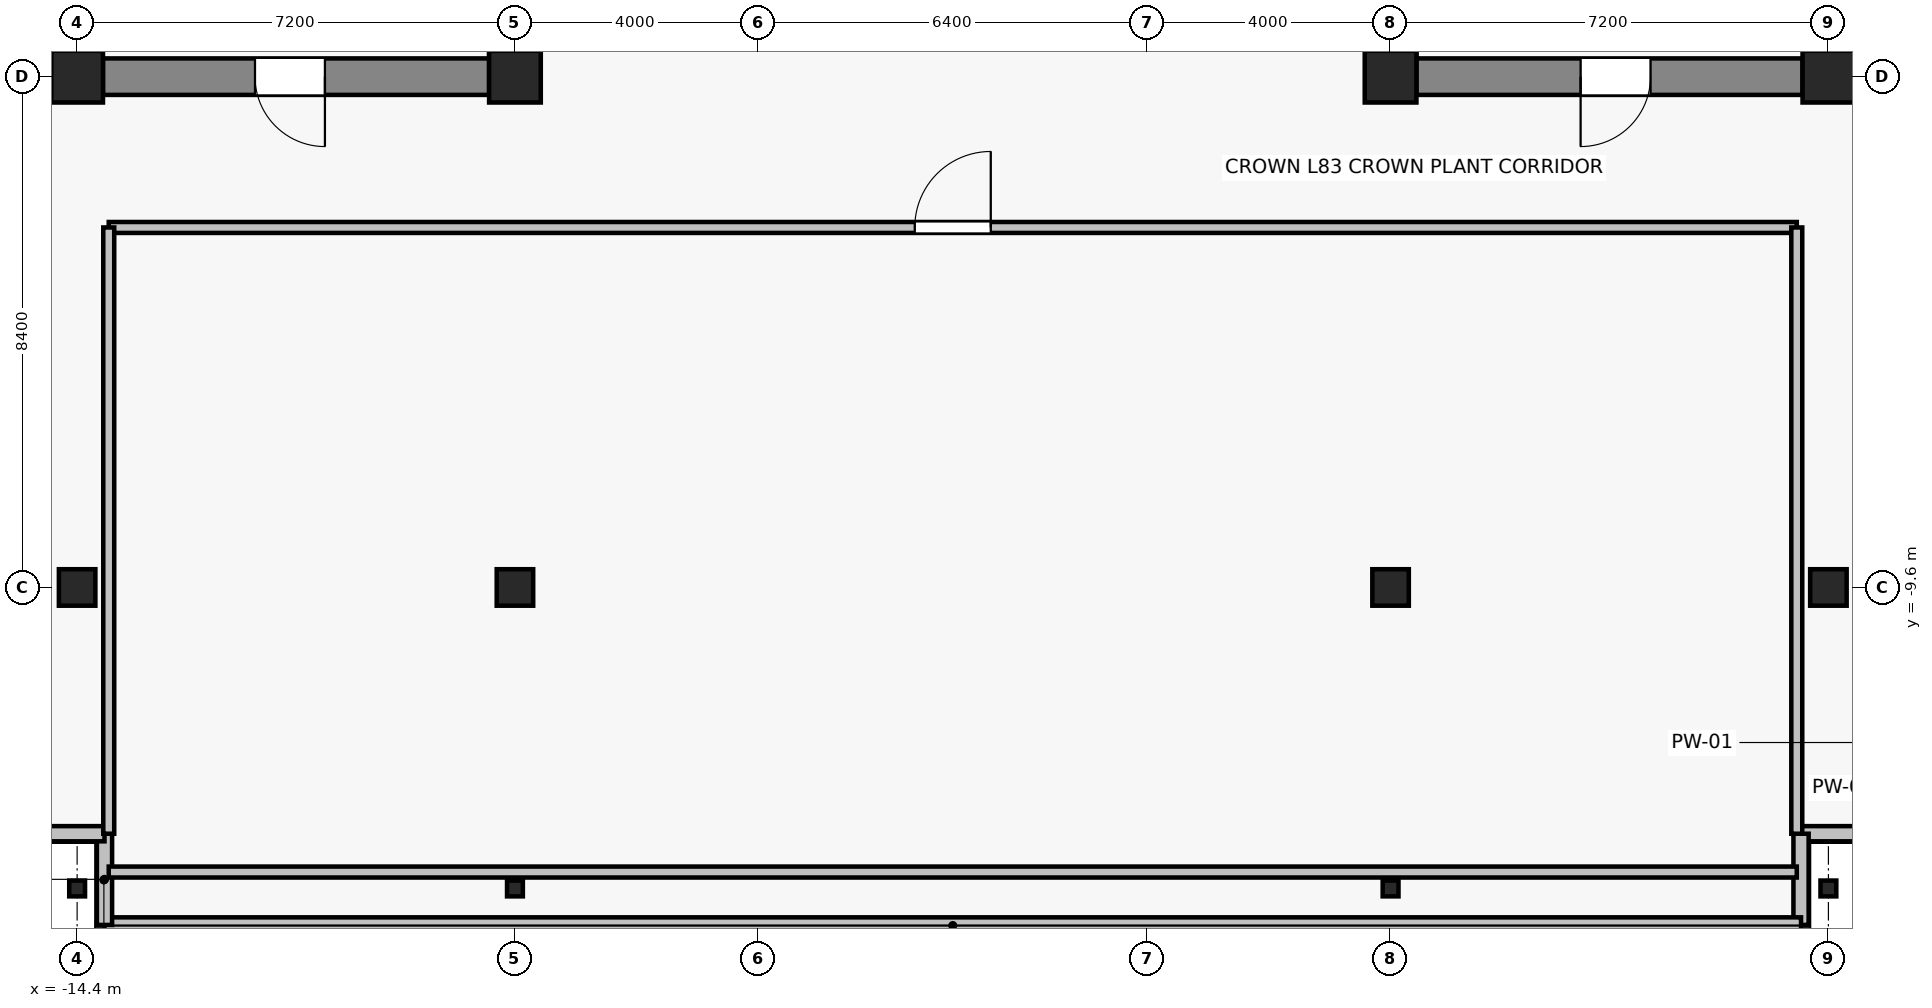
"""IFC4 building model, lengths in metres.
Left out: names, types, materials, properties, quantities, classifications, styles, units other than length and angle.
Written with IfcOpenShell. Run it as: python <this file> out.ifc"""

import sys

from ifc_helpers import new_model, si_unit, direction, frame, frame_2d, origin, origin_2d, place, context, subcontext, project, spatial, rectangle, i_section, extrude, source, transform, mapped, element, fill, save


model = new_model("IFC4")
c1 = context("Model", 3, precision=1e-05, world=origin(), true_north=direction((0.0, 1.0)))
c2 = subcontext(c1, "Body", "Model", "MODEL_VIEW")
j1 = project(units=[si_unit("LENGTHUNIT", "METRE"), si_unit("PLANEANGLEUNIT", "RADIAN")], contexts=[c1])
p1 = place(None, origin())
s1 = spatial("IfcSite", under=j1, at=p1, CompositionType="ELEMENT")
p2 = place(p1, origin())
s2 = spatial("IfcBuilding", under=s1, at=p2, CompositionType="ELEMENT")
p3 = place(p2, frame((0.0, 0.0, 294.6)))
s3 = spatial("IfcBuildingStorey", under=s2, at=p3, CompositionType="ELEMENT", Elevation=294.6)
for number, where, z_axis, x_axis in (
    (1, (-14.4, -1.2, 0.0), (0.0, 0.0, 1.0), (1.0, 0.0, 0.0)),
    (2, (-7.2, -1.2, 0.0), (0.0, 0.0, 1.0), (1.0, 0.0, 0.0)),
    (3, (7.2, -1.2, 0.0), (0.0, 0.0, 1.0), (1.0, 0.0, 0.0)),
    (4, (14.4, -1.2, 0.0), (0.0, 0.0, 1.0), (1.0, 0.0, 0.0)),
):
    element("IfcColumn", number, at=place(p3, frame(where, z_axis=z_axis, x_axis=x_axis)), inside=s3, PredefinedType="COLUMN", context=c2, shape_type="SweptSolid", body=[
        extrude(rectangle(XDim=0.85, YDim=0.85, at=origin_2d()), origin(), (0.0, 0.0, 1.0), 4.6),
    ])
p4 = place(p3, frame((-14.4, -9.6, 0.0), z_axis=(0.0, 0.0, 1.0), x_axis=(1.0, 0.0, 0.0)))
e5 = element("IfcColumn", 5, at=p4, inside=s3, PredefinedType="COLUMN", context=c2, shape_type="SweptSolid", body=[
    extrude(rectangle(XDim=0.6, YDim=0.6, at=origin_2d()), origin(), (0.0, 0.0, 1.0), 4.6),
])
p5 = place(p3, frame((-14.4, -14.55, 0.0), z_axis=(0.0, 0.0, 1.0), x_axis=(1.0, 0.0, 0.0)))
e6 = element("IfcColumn", 6, at=p5, inside=s3, PredefinedType="COLUMN", context=c2, shape_type="SweptSolid", body=[
    extrude(i_section(OverallWidth=0.26, OverallDepth=0.26, WebThickness=0.01, FlangeThickness=0.018, FilletRadius=0.024, at=origin_2d()), origin(), (0.0, 0.0, 1.0), 4.6),
])
p6 = place(p3, frame((-7.2, -9.6, 0.0), z_axis=(0.0, 0.0, 1.0), x_axis=(1.0, 0.0, 0.0)))
e7 = element("IfcColumn", 7, at=p6, inside=s3, PredefinedType="COLUMN", context=c2, shape_type="SweptSolid", body=[
    extrude(rectangle(XDim=0.6, YDim=0.6, at=origin_2d()), origin(), (0.0, 0.0, 1.0), 4.6),
])
p7 = place(p3, frame((-7.2, -14.55, 0.0), z_axis=(0.0, 0.0, 1.0), x_axis=(1.0, 0.0, 0.0)))
e8 = element("IfcColumn", 8, at=p7, inside=s3, PredefinedType="COLUMN", context=c2, shape_type="SweptSolid", body=[
    extrude(i_section(OverallWidth=0.26, OverallDepth=0.26, WebThickness=0.01, FlangeThickness=0.018, FilletRadius=0.024, at=origin_2d()), origin(), (0.0, 0.0, 1.0), 4.6),
])
p8 = place(p3, frame((7.2, -9.6, 0.0), z_axis=(0.0, 0.0, 1.0), x_axis=(1.0, 0.0, 0.0)))
e9 = element("IfcColumn", 9, at=p8, inside=s3, PredefinedType="COLUMN", context=c2, shape_type="SweptSolid", body=[
    extrude(rectangle(XDim=0.6, YDim=0.6, at=origin_2d()), origin(), (0.0, 0.0, 1.0), 4.6),
])
p9 = place(p3, frame((7.2, -14.55, 0.0), z_axis=(0.0, 0.0, 1.0), x_axis=(1.0, 0.0, 0.0)))
e10 = element("IfcColumn", 10, at=p9, inside=s3, PredefinedType="COLUMN", context=c2, shape_type="SweptSolid", body=[
    extrude(i_section(OverallWidth=0.26, OverallDepth=0.26, WebThickness=0.01, FlangeThickness=0.018, FilletRadius=0.024, at=origin_2d()), origin(), (0.0, 0.0, 1.0), 4.6),
])
p10 = place(p3, frame((14.4, -9.6, 0.0), z_axis=(0.0, 0.0, 1.0), x_axis=(1.0, 0.0, 0.0)))
e11 = element("IfcColumn", 11, at=p10, inside=s3, PredefinedType="COLUMN", context=c2, shape_type="SweptSolid", body=[
    extrude(rectangle(XDim=0.6, YDim=0.6, at=origin_2d()), origin(), (0.0, 0.0, 1.0), 4.6),
])
p11 = place(p3, frame((14.4, -14.55, 0.0), z_axis=(0.0, 0.0, 1.0), x_axis=(1.0, 0.0, 0.0)))
e12 = element("IfcColumn", 12, at=p11, inside=s3, PredefinedType="COLUMN", context=c2, shape_type="SweptSolid", body=[
    extrude(i_section(OverallWidth=0.26, OverallDepth=0.26, WebThickness=0.01, FlangeThickness=0.018, FilletRadius=0.024, at=origin_2d()), origin(), (0.0, 0.0, 1.0), 4.6),
])
p12 = place(p3, frame((-7.625, -1.2, 0.0), z_axis=(0.0, 0.0, 1.0), x_axis=(-1.0, 0.0, 0.0)))
e13 = element("IfcWall", 13, at=p12, inside=s3, PredefinedType="SHEAR", context=c2, shape_type="SweptSolid", body=[
    extrude(rectangle(XDim=6.35, YDim=0.6, at=frame_2d((3.175, 0.0))), origin(), (0.0, 0.0, 1.0), 4.38),
])
p13 = place(p12, frame((2.7, 0.0, 0.0)))
e14 = element("IfcOpeningElement", 14, at=p13, cuts=e13, PredefinedType="OPENING", context=c2, shape_type="SweptSolid", body=[
    extrude(rectangle(XDim=1.15, YDim=2.15, at=frame_2d((0.575, 1.075))), frame((0.0, 0.31, 0.0), z_axis=(0.0, -1.0, 0.0), x_axis=(1.0, 0.0, 0.0)), (0.0, 0.0, 1.0), 0.62),
])
p14 = place(p3, frame((13.975, -1.2, 0.0), z_axis=(0.0, 0.0, 1.0), x_axis=(-1.0, 0.0, 0.0)))
e15 = element("IfcWall", 15, at=p14, inside=s3, PredefinedType="SHEAR", context=c2, shape_type="SweptSolid", body=[
    extrude(rectangle(XDim=6.35, YDim=0.6, at=frame_2d((3.175, 0.0))), origin(), (0.0, 0.0, 1.0), 4.38),
])
p15 = place(p14, frame((2.5, 0.0, 0.0)))
e16 = element("IfcOpeningElement", 16, at=p15, cuts=e15, PredefinedType="OPENING", context=c2, shape_type="SweptSolid", body=[
    extrude(rectangle(XDim=1.15, YDim=2.15, at=frame_2d((0.575, 1.075))), frame((0.0, 0.31, 0.0), z_axis=(0.0, -1.0, 0.0), x_axis=(1.0, 0.0, 0.0)), (0.0, 0.0, 1.0), 0.62),
])
for number, where, z_axis, x_axis in (
    (17, (-7.4, -0.9, 0.0), (0.0, 0.0, 1.0), (0.0, 1.0, 0.0)),
    (18, (7.4, -0.9, 0.0), (0.0, 0.0, 1.0), (0.0, 1.0, 0.0)),
):
    element("IfcWall", number, at=place(p3, frame(where, z_axis=z_axis, x_axis=x_axis)), inside=s3, PredefinedType="SHEAR", context=c2, shape_type="SweptSolid", body=[
        extrude(rectangle(XDim=4.15, YDim=0.45, at=frame_2d((2.075, 0.0))), origin(), (0.0, 0.0, 1.0), 4.38),
    ])
for number, where, z_axis, x_axis in (
    (19, (14.56, -13.91, 0.0), (0.0, 0.0, 1.0), (1.0, 0.0, 0.0)),
    (20, (14.56, -15.41, 0.0), (0.0, 0.0, 1.0), (0.0, 1.0, 0.0)),
    (21, (-14.56, -13.91, 0.0), (0.0, 0.0, 1.0), (0.0, -1.0, 0.0)),
    (22, (-16.06, -13.91, 0.0), (0.0, 0.0, 1.0), (1.0, 0.0, 0.0)),
):
    element("IfcWall", number, at=place(p3, frame(where, z_axis=z_axis, x_axis=x_axis)), inside=s3, PredefinedType="SOLIDWALL", context=c2, shape_type="SweptSolid", body=[
        extrude(rectangle(XDim=1.5, YDim=0.22, at=frame_2d((0.75, 0.0))), origin(), (0.0, 0.0, 1.0), 4.38),
    ])
p16 = place(p3, frame((-2.12, -14.28, 0.0), z_axis=(0.0, 0.0, 1.0), x_axis=(-1.0, 0.0, 0.0)))
e23 = element("IfcWall", 23, at=p16, inside=s3, PredefinedType="PARTITIONING", context=c2, shape_type="SweptSolid", body=[
    extrude(rectangle(XDim=11.76, YDim=0.18, at=frame_2d((5.88, 0.0))), origin(), (0.0, 0.0, 1.0), 3.77),
])
p17 = place(p3, frame((-13.88, -3.68, 0.0), z_axis=(0.0, 0.0, 1.0), x_axis=(1.0, 0.0, 0.0)))
e24 = element("IfcWall", 24, at=p17, inside=s3, PredefinedType="PARTITIONING", context=c2, shape_type="SweptSolid", body=[
    extrude(rectangle(XDim=11.76, YDim=0.18, at=frame_2d((5.88, 0.0))), origin(), (0.0, 0.0, 1.0), 3.77),
])
p18 = place(p17, frame((5.255, 0.0, 0.0)))
e25 = element("IfcOpeningElement", 25, at=p18, cuts=e24, PredefinedType="OPENING", context=c2, shape_type="SweptSolid", body=[
    extrude(rectangle(XDim=1.25, YDim=2.15, at=frame_2d((0.625, 1.075))), frame((0.0, 0.1, 0.0), z_axis=(0.0, -1.0, 0.0), x_axis=(1.0, 0.0, 0.0)), (0.0, 0.0, 1.0), 0.2),
])
for number, where, z_axis, x_axis in (
    (26, (-13.88, -14.28, 0.0), (0.0, 0.0, 1.0), (0.0, 1.0, 0.0)),
    (27, (-2.12, -3.68, 0.0), (0.0, 0.0, 1.0), (0.0, -1.0, 0.0)),
):
    element("IfcWall", number, at=place(p3, frame(where, z_axis=z_axis, x_axis=x_axis)), inside=s3, PredefinedType="PARTITIONING", context=c2, shape_type="SweptSolid", body=[
        extrude(rectangle(XDim=10.6, YDim=0.18, at=frame_2d((5.3, 0.0))), origin(), (0.0, 0.0, 1.0), 3.77),
    ])
p19 = place(p3, frame((6.88, -14.28, 0.0), z_axis=(0.0, 0.0, 1.0), x_axis=(-1.0, 0.0, 0.0)))
e28 = element("IfcWall", 28, at=p19, inside=s3, PredefinedType="PARTITIONING", context=c2, shape_type="SweptSolid", body=[
    extrude(rectangle(XDim=9.0, YDim=0.18, at=frame_2d((4.5, 0.0))), origin(), (0.0, 0.0, 1.0), 4.09),
])
p20 = place(p3, frame((-2.12, -3.68, 0.0), z_axis=(0.0, 0.0, 1.0), x_axis=(1.0, 0.0, 0.0)))
e29 = element("IfcWall", 29, at=p20, inside=s3, PredefinedType="PARTITIONING", context=c2, shape_type="SweptSolid", body=[
    extrude(rectangle(XDim=9.0, YDim=0.18, at=frame_2d((4.5, 0.0))), origin(), (0.0, 0.0, 1.0), 4.38),
])
p21 = place(p20, frame((3.875, 0.0, 0.0)))
e30 = element("IfcOpeningElement", 30, at=p21, cuts=e29, PredefinedType="OPENING", context=c2, shape_type="SweptSolid", body=[
    extrude(rectangle(XDim=1.25, YDim=2.15, at=frame_2d((0.625, 1.075))), frame((0.0, 0.1, 0.0), z_axis=(0.0, -1.0, 0.0), x_axis=(1.0, 0.0, 0.0)), (0.0, 0.0, 1.0), 0.2),
])
p22 = place(p3, frame((6.88, -3.68, 0.0), z_axis=(0.0, 0.0, 1.0), x_axis=(0.0, -1.0, 0.0)))
e31 = element("IfcWall", 31, at=p22, inside=s3, PredefinedType="PARTITIONING", context=c2, shape_type="SweptSolid", body=[
    extrude(rectangle(XDim=10.6, YDim=0.18, at=frame_2d((5.3, 0.0))), origin(), (0.0, 0.0, 1.0), 3.77),
])
p23 = place(p3, frame((13.88, -14.28, 0.0), z_axis=(0.0, 0.0, 1.0), x_axis=(-1.0, 0.0, 0.0)))
e32 = element("IfcWall", 32, at=p23, inside=s3, PredefinedType="PARTITIONING", context=c2, shape_type="SweptSolid", body=[
    extrude(rectangle(XDim=7.0, YDim=0.18, at=frame_2d((3.5, 0.0))), origin(), (0.0, 0.0, 1.0), 3.77),
])
p24 = place(p3, frame((6.88, -3.68, 0.0), z_axis=(0.0, 0.0, 1.0), x_axis=(1.0, 0.0, 0.0)))
e33 = element("IfcWall", 33, at=p24, inside=s3, PredefinedType="PARTITIONING", context=c2, shape_type="SweptSolid", body=[
    extrude(rectangle(XDim=7.0, YDim=0.18, at=frame_2d((3.5, 0.0))), origin(), (0.0, 0.0, 1.0), 3.77),
])
p25 = place(p24, frame((2.875, 0.0, 0.0)))
e34 = element("IfcOpeningElement", 34, at=p25, cuts=e33, PredefinedType="OPENING", context=c2, shape_type="SweptSolid", body=[
    extrude(rectangle(XDim=1.25, YDim=2.15, at=frame_2d((0.625, 1.075))), frame((0.0, 0.1, 0.0), z_axis=(0.0, -1.0, 0.0), x_axis=(1.0, 0.0, 0.0)), (0.0, 0.0, 1.0), 0.2),
])
p26 = place(p3, frame((13.88, -3.68, 0.0), z_axis=(0.0, 0.0, 1.0), x_axis=(0.0, -1.0, 0.0)))
e35 = element("IfcWall", 35, at=p26, inside=s3, PredefinedType="PARTITIONING", context=c2, shape_type="SweptSolid", body=[
    extrude(rectangle(XDim=10.6, YDim=0.18, at=frame_2d((5.3, 0.0))), origin(), (0.0, 0.0, 1.0), 3.77),
])
m1 = source(origin(), c2, "Body", "SweptSolid", [
    extrude(rectangle(XDim=1.15, YDim=2.15, at=frame_2d((0.575, 1.075))), frame((0.0, 0.025, 0.0), z_axis=(0.0, -1.0, 0.0), x_axis=(1.0, 0.0, 0.0)), (0.0, 0.0, 1.0), 0.05),
])
p27 = place(p13, origin())
e36 = element("IfcDoor", 36, at=p27, inside=s3, OperationType="SINGLE_SWING_LEFT", PredefinedType="DOOR", context=c2, shape_type="MappedRepresentation", body=[
    mapped(m1, transform((0.0, 0.0, 0.0), x_axis=(1.0, 0.0, 0.0), y_axis=(0.0, 1.0, 0.0), z_axis=(0.0, 0.0, 1.0), scale=1.0)),
])
fill(e14, e36)
p28 = place(p15, origin())
e37 = element("IfcDoor", 37, at=p28, inside=s3, OperationType="SINGLE_SWING_RIGHT", PredefinedType="DOOR", context=c2, shape_type="MappedRepresentation", body=[
    mapped(m1, transform((0.0, 0.0, 0.0), x_axis=(1.0, 0.0, 0.0), y_axis=(0.0, 1.0, 0.0), z_axis=(0.0, 0.0, 1.0), scale=1.0)),
])
fill(e16, e37)
m2 = source(origin(), c2, "Body", "SweptSolid", [
    extrude(rectangle(XDim=1.25, YDim=2.15, at=frame_2d((0.625, 1.075))), frame((0.0, 0.025, 0.0), z_axis=(0.0, -1.0, 0.0), x_axis=(1.0, 0.0, 0.0)), (0.0, 0.0, 1.0), 0.05),
])
p29 = place(p18, origin())
e38 = element("IfcDoor", 38, at=p29, inside=s3, OperationType="SINGLE_SWING_RIGHT", PredefinedType="DOOR", context=c2, shape_type="MappedRepresentation", body=[
    mapped(m2, transform((0.0, 0.0, 0.0), x_axis=(1.0, 0.0, 0.0), y_axis=(0.0, 1.0, 0.0), z_axis=(0.0, 0.0, 1.0), scale=1.0)),
])
fill(e25, e38)
p30 = place(p21, origin())
e39 = element("IfcDoor", 39, at=p30, inside=s3, OperationType="SINGLE_SWING_LEFT", PredefinedType="DOOR", context=c2, shape_type="MappedRepresentation", body=[
    mapped(m2, transform((0.0, 0.0, 0.0), x_axis=(1.0, 0.0, 0.0), y_axis=(0.0, 1.0, 0.0), z_axis=(0.0, 0.0, 1.0), scale=1.0)),
])
fill(e30, e39)
p31 = place(p25, origin())
e40 = element("IfcDoor", 40, at=p31, inside=s3, OperationType="SINGLE_SWING_RIGHT", PredefinedType="DOOR", context=c2, shape_type="MappedRepresentation", body=[
    mapped(m2, transform((0.0, 0.0, 0.0), x_axis=(1.0, 0.0, 0.0), y_axis=(0.0, 1.0, 0.0), z_axis=(0.0, 0.0, 1.0), scale=1.0)),
])
fill(e34, e40)
save(model, sys.argv[1])
